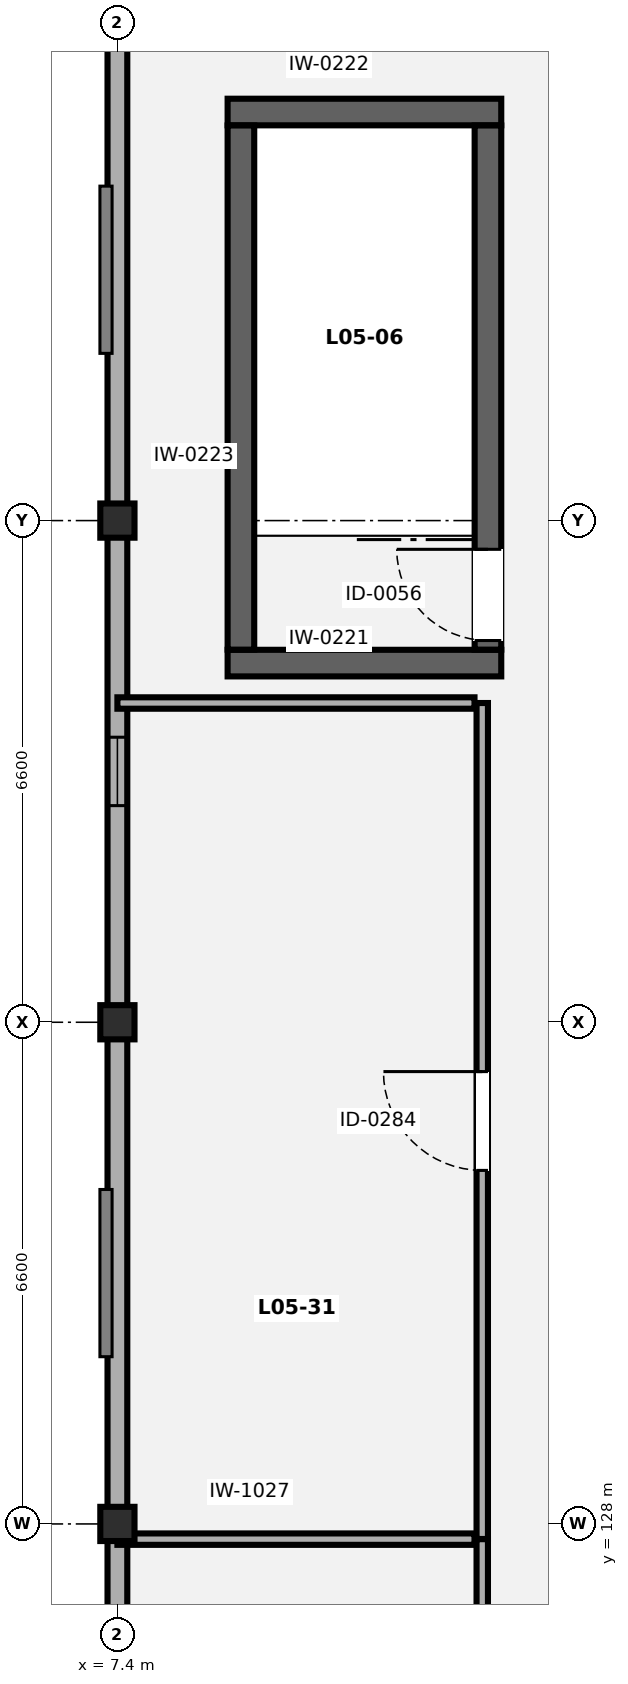
"""IFC4 building model, lengths in metres.
Left out: names, types, materials, properties, quantities, classifications, styles, units other than length and angle.
Written with IfcOpenShell. Run it as: python <this file> out.ifc"""

import sys

from ifc_helpers import new_model, si_unit, direction, frame, frame_2d, origin, origin_2d, place, context, subcontext, project, spatial, rectangle, extrude, element, fill, save


model = new_model("IFC4")
c1 = context("Model", 3, precision=1e-05, world=origin(), true_north=direction((0.0, 1.0)))
c2 = subcontext(c1, "Body", "Model", "MODEL_VIEW")
j1 = project(units=[si_unit("LENGTHUNIT", "METRE"), si_unit("PLANEANGLEUNIT", "RADIAN")], contexts=[c1])
p1 = place(None, origin())
s1 = spatial("IfcSite", under=j1, at=p1, CompositionType="ELEMENT")
p2 = place(p1, origin())
s2 = spatial("IfcBuilding", under=s1, at=p2, CompositionType="ELEMENT")
p3 = place(p2, frame((0.0, 0.0, 21.7)))
s3 = spatial("IfcBuildingStorey", under=s2, at=p3, CompositionType="ELEMENT", Elevation=21.7)
for number, where, z_axis, x_axis in (
    (1, (7.4, 128.0, 0.0), (0.0, 0.0, 1.0), (1.0, 0.0, 0.0)),
    (2, (7.4, 134.6, 0.0), (0.0, 0.0, 1.0), (1.0, 0.0, 0.0)),
    (3, (7.4, 141.2, 0.0), (0.0, 0.0, 1.0), (1.0, 0.0, 0.0)),
):
    element("IfcColumn", number, at=place(p3, frame(where, z_axis=z_axis, x_axis=x_axis)), inside=s3, PredefinedType="PILASTER", context=c2, shape_type="SweptSolid", body=[
        extrude(rectangle(XDim=0.45, YDim=0.45, at=origin_2d()), origin(), (0.0, 0.0, 1.0), 3.92),
    ])
p4 = place(p3, frame((7.4, 95.223, 0.0), z_axis=(0.0, 0.0, 1.0), x_axis=(0.0, 1.0, 0.0)))
e4 = element("IfcWall", 4, at=p4, inside=s3, PredefinedType="SOLIDWALL", context=c2, shape_type="SweptSolid", body=[
    extrude(rectangle(XDim=52.354, YDim=0.26, at=frame_2d((26.177, 0.0))), origin(), (0.0, 0.0, 1.0), 2.885),
])
p5 = place(p4, frame((15.827, 0.0, 0.85)))
e5 = element("IfcOpeningElement", 5, at=p5, cuts=e4, PredefinedType="OPENING", context=c2, shape_type="SweptSolid", body=[
    extrude(rectangle(XDim=0.9, YDim=1.35, at=frame_2d((0.45, 0.675))), frame((0.0, 0.14, 0.0), z_axis=(0.0, -1.0, 0.0), x_axis=(1.0, 0.0, 0.0)), (0.0, 0.0, 1.0), 0.28),
])
p6 = place(p4, frame((29.027, 0.0, 0.85)))
e6 = element("IfcOpeningElement", 6, at=p6, cuts=e4, PredefinedType="OPENING", context=c2, shape_type="SweptSolid", body=[
    extrude(rectangle(XDim=0.9, YDim=1.35, at=frame_2d((0.45, 0.675))), frame((0.0, 0.14, 0.0), z_axis=(0.0, -1.0, 0.0), x_axis=(1.0, 0.0, 0.0)), (0.0, 0.0, 1.0), 0.28),
])
p7 = place(p4, frame((42.227, 0.0, 0.85)))
e7 = element("IfcOpeningElement", 7, at=p7, cuts=e4, PredefinedType="OPENING", context=c2, shape_type="SweptSolid", body=[
    extrude(rectangle(XDim=0.9, YDim=1.35, at=frame_2d((0.45, 0.675))), frame((0.0, 0.14, 0.0), z_axis=(0.0, -1.0, 0.0), x_axis=(1.0, 0.0, 0.0)), (0.0, 0.0, 1.0), 0.28),
])
for number, where, z_axis, x_axis in (
    (8, (8.85, 139.325, 0.0), (0.0, 0.0, 1.0), (1.0, 0.0, 0.0)),
    (9, (8.85, 146.575, 0.0), (0.0, 0.0, 1.0), (1.0, 0.0, 0.0)),
):
    element("IfcWall", number, at=place(p3, frame(where, z_axis=z_axis, x_axis=x_axis)), inside=s3, PredefinedType="SHEAR", context=c2, shape_type="SweptSolid", body=[
        extrude(rectangle(XDim=3.6, YDim=0.35, at=frame_2d((1.8, 0.0))), origin(), (0.0, 0.0, 1.0), 3.9),
    ])
p8 = place(p3, frame((9.025, 139.502, 0.0), z_axis=(0.0, 0.0, 1.0), x_axis=(0.0, 1.0, 0.0)))
e10 = element("IfcWall", 10, at=p8, inside=s3, PredefinedType="SHEAR", context=c2, shape_type="SweptSolid", body=[
    extrude(rectangle(XDim=6.896, YDim=0.35, at=frame_2d((3.448, 0.0))), origin(), (0.0, 0.0, 1.0), 3.9),
])
p9 = place(p3, frame((12.275, 139.502, 0.0), z_axis=(0.0, 0.0, 1.0), x_axis=(0.0, 1.0, 0.0)))
e11 = element("IfcWall", 11, at=p9, inside=s3, PredefinedType="SHEAR", context=c2, shape_type="SweptSolid", body=[
    extrude(rectangle(XDim=6.896, YDim=0.35, at=frame_2d((3.448, 0.0))), origin(), (0.0, 0.0, 1.0), 3.9),
])
p10 = place(p9, frame((0.12, 0.0, 0.0)))
e12 = element("IfcOpeningElement", 12, at=p10, cuts=e11, PredefinedType="OPENING", context=c2, shape_type="SweptSolid", body=[
    extrude(rectangle(XDim=1.2, YDim=2.15, at=frame_2d((0.6, 1.075))), frame((0.0, 0.185, 0.0), z_axis=(0.0, -1.0, 0.0), x_axis=(1.0, 0.0, 0.0)), (0.0, 0.0, 1.0), 0.37),
])
p11 = place(p3, frame((7.4, 127.8, 0.0), z_axis=(0.0, 0.0, 1.0), x_axis=(1.0, 0.0, 0.0)))
e13 = element("IfcWall", 13, at=p11, inside=s3, PredefinedType="PARTITIONING", context=c2, shape_type="SweptSolid", body=[
    extrude(rectangle(XDim=4.698, YDim=0.15, at=frame_2d((2.349, 0.0))), origin(), (0.0, 0.0, 1.0), 2.435),
])
p12 = place(p3, frame((12.2, 114.502, 0.0), z_axis=(0.0, 0.0, 1.0), x_axis=(0.0, 1.0, 0.0)))
e14 = element("IfcWall", 14, at=p12, inside=s3, PredefinedType="PARTITIONING", context=c2, shape_type="SweptSolid", body=[
    extrude(rectangle(XDim=13.298, YDim=0.15, at=frame_2d((6.649, 0.0))), origin(), (0.0, 0.0, 1.0), 3.9),
])
p13 = place(p12, frame((5.649, 0.0, 0.0)))
e15 = element("IfcOpeningElement", 15, at=p13, cuts=e14, PredefinedType="OPENING", context=c2, shape_type="SweptSolid", body=[
    extrude(rectangle(XDim=1.3, YDim=2.2, at=frame_2d((0.65, 1.1))), frame((0.0, 0.085, 0.0), z_axis=(0.0, -1.0, 0.0), x_axis=(1.0, 0.0, 0.0)), (0.0, 0.0, 1.0), 0.17),
])
p14 = place(p3, frame((7.4, 138.8, 0.0), z_axis=(0.0, 0.0, 1.0), x_axis=(1.0, 0.0, 0.0)))
e16 = element("IfcWall", 16, at=p14, inside=s3, PredefinedType="PARTITIONING", context=c2, shape_type="SweptSolid", body=[
    extrude(rectangle(XDim=4.698, YDim=0.15, at=frame_2d((2.349, 0.0))), origin(), (0.0, 0.0, 1.0), 3.9),
])
p15 = place(p3, frame((12.2, 127.802, 0.0), z_axis=(0.0, 0.0, 1.0), x_axis=(0.0, 1.0, 0.0)))
e17 = element("IfcWall", 17, at=p15, inside=s3, PredefinedType="PARTITIONING", context=c2, shape_type="SweptSolid", body=[
    extrude(rectangle(XDim=10.998, YDim=0.15, at=frame_2d((5.499, 0.0))), origin(), (0.0, 0.0, 1.0), 3.9),
])
p16 = place(p15, frame((4.849, 0.0, 0.0)))
e18 = element("IfcOpeningElement", 18, at=p16, cuts=e17, PredefinedType="OPENING", context=c2, shape_type="SweptSolid", body=[
    extrude(rectangle(XDim=1.3, YDim=2.2, at=frame_2d((0.65, 1.1))), frame((0.0, 0.085, 0.0), z_axis=(0.0, -1.0, 0.0), x_axis=(1.0, 0.0, 0.0)), (0.0, 0.0, 1.0), 0.17),
])
p17 = place(p7, origin())
e19 = element("IfcWindow", 19, at=p17, inside=s3, PartitioningType="SINGLE_PANEL", PredefinedType="WINDOW", context=c2, shape_type="SweptSolid", body=[
    extrude(rectangle(XDim=0.9, YDim=1.35, at=frame_2d((0.45, 0.675))), frame((0.0, 0.03, 0.0), z_axis=(0.0, -1.0, 0.0), x_axis=(1.0, 0.0, 0.0)), (0.0, 0.0, 1.0), 0.06),
])
fill(e7, e19)
p18 = place(p10, origin())
e20 = element("IfcDoor", 20, at=p18, inside=s3, OperationType="SINGLE_SWING_RIGHT", PredefinedType="DOOR", context=c2, shape_type="SweptSolid", body=[
    extrude(rectangle(XDim=1.2, YDim=2.15, at=frame_2d((0.6, 1.075))), frame((0.0, 0.025, 0.0), z_axis=(0.0, -1.0, 0.0), x_axis=(1.0, 0.0, 0.0)), (0.0, 0.0, 1.0), 0.05),
])
fill(e12, e20)
p19 = place(p16, origin())
e21 = element("IfcDoor", 21, at=p19, inside=s3, OperationType="SINGLE_SWING_RIGHT", PredefinedType="DOOR", context=c2, shape_type="SweptSolid", body=[
    extrude(rectangle(XDim=1.3, YDim=2.2, at=frame_2d((0.65, 1.1))), frame((0.0, 0.025, 0.0), z_axis=(0.0, -1.0, 0.0), x_axis=(1.0, 0.0, 0.0)), (0.0, 0.0, 1.0), 0.05),
])
fill(e18, e21)
save(model, sys.argv[1])
